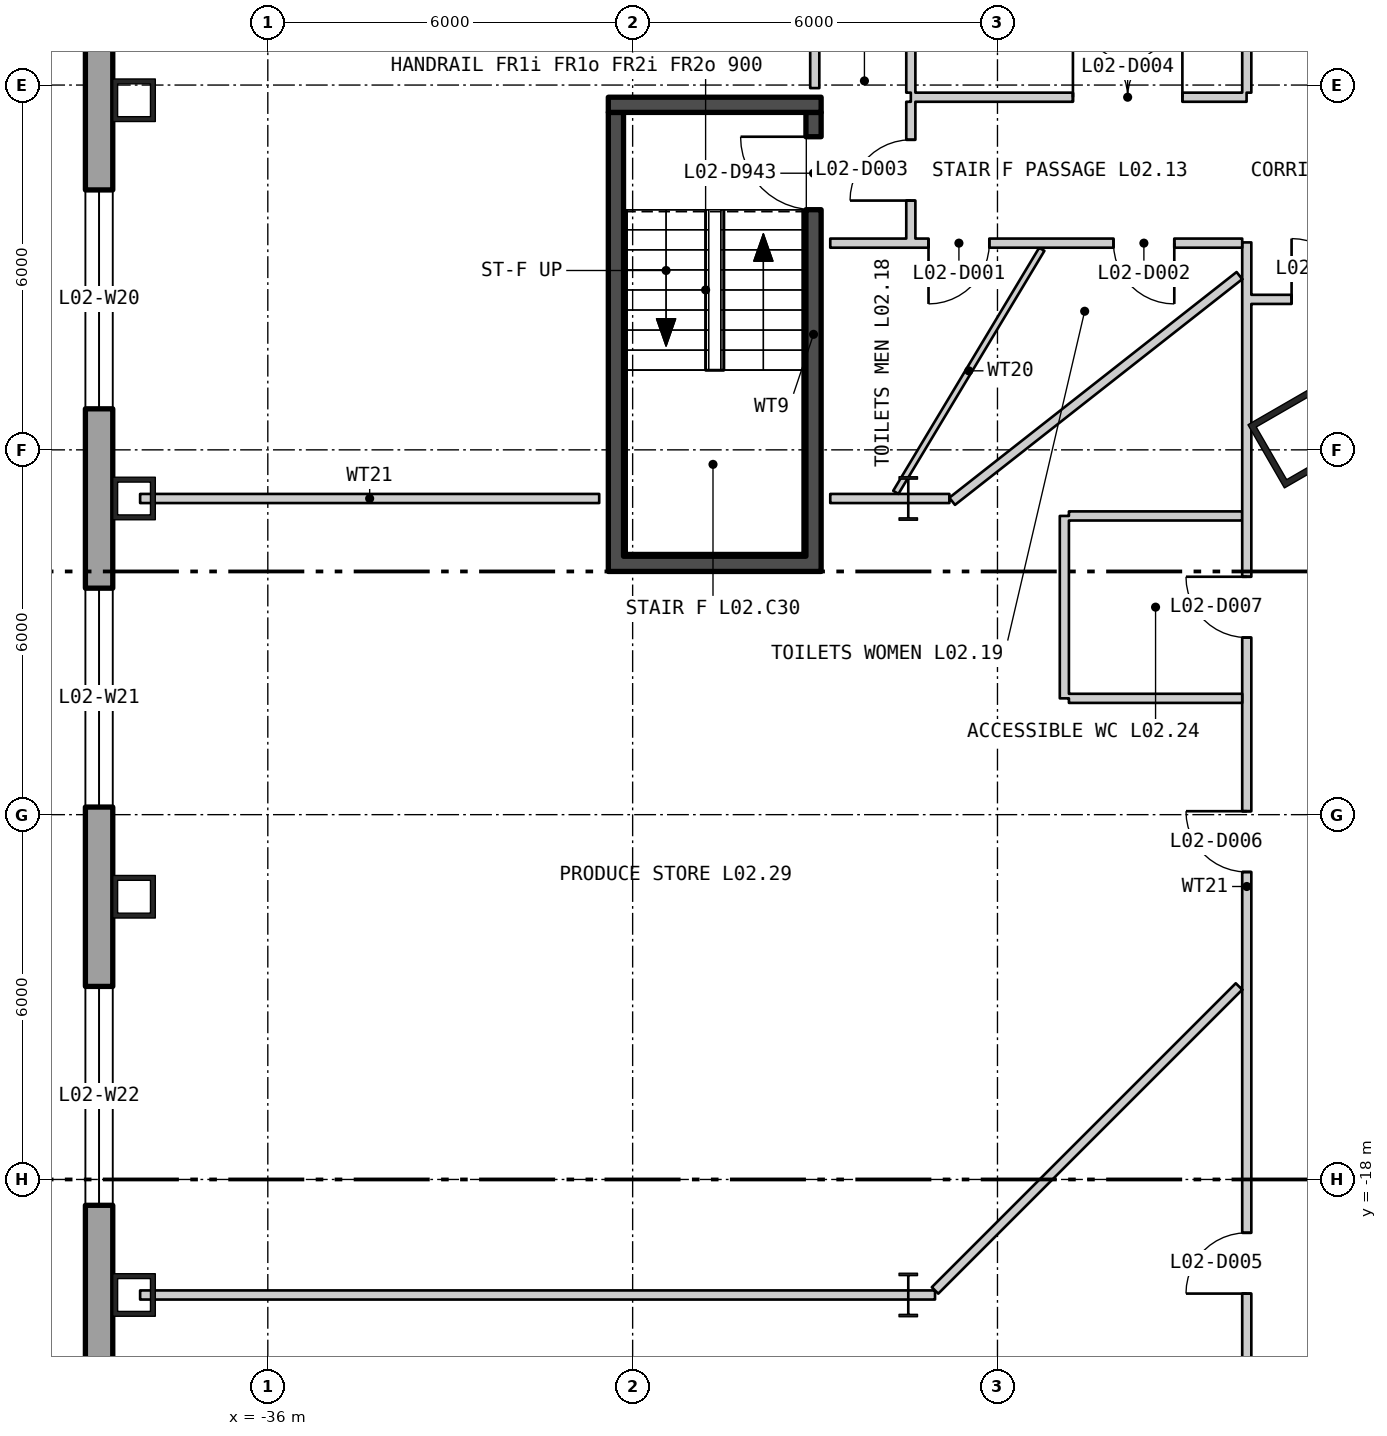
"""IFC4 building model, lengths in metres.
Left out: names, types, materials, properties, quantities, classifications, styles, units other than length and angle.
Written with IfcOpenShell. Run it as: python <this file> out.ifc"""

import sys

from ifc_helpers import new_model, si_unit, direction, frame, frame_2d, origin, origin_2d, place, context, subcontext, project, spatial, polyline, rectangle, hollow_rectangle, i_section, outline, extrude, element, fill, save


model = new_model("IFC4")
c1 = context("Model", 3, precision=1e-05, world=origin(), true_north=direction((0.0, 1.0)))
c2 = subcontext(c1, "Body", "Model", "MODEL_VIEW")
j1 = project(units=[si_unit("LENGTHUNIT", "METRE"), si_unit("PLANEANGLEUNIT", "RADIAN")], contexts=[c1])
p1 = place(None, origin())
s1 = spatial("IfcSite", under=j1, at=p1, CompositionType="ELEMENT")
p2 = place(p1, origin())
s2 = spatial("IfcBuilding", under=s1, at=p2, CompositionType="ELEMENT")
p3 = place(p2, frame((0.0, 0.0, 13.5)))
s3 = spatial("IfcBuildingStorey", under=s2, at=p3, CompositionType="ELEMENT", Elevation=13.5)
p4 = place(p3, frame((-19.061, -5.807, 0.0), z_axis=(0.0, 0.0, 1.0), x_axis=(0.5, -0.866025403784, 0.0)))
e1 = element("IfcColumn", 1, at=p4, inside=s3, PredefinedType="COLUMN", context=c2, shape_type="SweptSolid", body=[
    extrude(hollow_rectangle(XDim=1.2, YDim=1.2, WallThickness=0.1, at=origin_2d()), origin(), (0.0, 0.0, 1.0), 5.1),
])
for number, where, z_axis, x_axis in (
    (2, (-38.2, -0.25, 0.0), (0.0, 0.0, 1.0), (0.0, -1.0, 0.0)),
    (3, (-38.2, -6.8, 0.0), (0.0, 0.0, 1.0), (0.0, -1.0, 0.0)),
    (4, (-38.2, -13.35, 0.0), (0.0, 0.0, 1.0), (0.0, -1.0, 0.0)),
    (5, (-38.2, -19.9, 0.0), (0.0, 0.0, 1.0), (0.0, -1.0, 0.0)),
):
    element("IfcColumn", number, at=place(p3, frame(where, z_axis=z_axis, x_axis=x_axis)), inside=s3, PredefinedType="COLUMN", context=c2, shape_type="SweptSolid", body=[
        extrude(hollow_rectangle(XDim=0.7, YDim=0.7, WallThickness=0.08, at=origin_2d()), origin(), (0.0, 0.0, 1.0), 5.1),
    ])
for number, where, z_axis, x_axis in (
    (6, (-25.467, -6.8, 0.0), (0.0, 0.0, 1.0), (1.0, 0.0, 0.0)),
    (7, (-25.467, -19.9, 0.0), (0.0, 0.0, 1.0), (1.0, 0.0, 0.0)),
):
    element("IfcColumn", number, at=place(p3, frame(where, z_axis=z_axis, x_axis=x_axis)), inside=s3, PredefinedType="COLUMN", context=c2, shape_type="SweptSolid", body=[
        extrude(i_section(OverallWidth=0.304, OverallDepth=0.716, WebThickness=0.021, FlangeThickness=0.04, at=origin_2d()), origin(), (0.0, 0.0, 1.0), 5.1),
    ])
p5 = place(p3, frame((-38.775, 19.975, -0.4), z_axis=(0.0, 0.0, 1.0), x_axis=(0.0, -1.0, 0.0)))
e8 = element("IfcWall", 8, at=p5, inside=s3, PredefinedType="SOLIDWALL", context=c2, shape_type="SweptSolid", body=[
    extrude(outline(polyline([(-0.225, -0.225), (53.775, -0.225), (53.325, 0.225), (0.225, 0.225), (-0.225, -0.225)])), origin(), (0.0, 0.0, 1.0), 5.1),
])
p6 = place(p5, frame((2.05, 0.0, 1.3)))
e9 = element("IfcOpeningElement", 9, at=p6, cuts=e8, PredefinedType="OPENING", context=c2, shape_type="SweptSolid", body=[
    extrude(rectangle(XDim=3.6, YDim=3.2, at=frame_2d((1.8, 1.6))), frame((0.0, 0.235, 0.0), z_axis=(0.0, -1.0, 0.0), x_axis=(1.0, 0.0, 0.0)), (0.0, 0.0, 1.0), 0.47),
])
p7 = place(p5, frame((8.6, 0.0, 1.3)))
e10 = element("IfcOpeningElement", 10, at=p7, cuts=e8, PredefinedType="OPENING", context=c2, shape_type="SweptSolid", body=[
    extrude(rectangle(XDim=3.6, YDim=3.2, at=frame_2d((1.8, 1.6))), frame((0.0, 0.235, 0.0), z_axis=(0.0, -1.0, 0.0), x_axis=(1.0, 0.0, 0.0)), (0.0, 0.0, 1.0), 0.47),
])
p8 = place(p5, frame((15.15, 0.0, 1.3)))
e11 = element("IfcOpeningElement", 11, at=p8, cuts=e8, PredefinedType="OPENING", context=c2, shape_type="SweptSolid", body=[
    extrude(rectangle(XDim=3.6, YDim=3.2, at=frame_2d((1.8, 1.6))), frame((0.0, 0.235, 0.0), z_axis=(0.0, -1.0, 0.0), x_axis=(1.0, 0.0, 0.0)), (0.0, 0.0, 1.0), 0.47),
])
p9 = place(p5, frame((21.7, 0.0, 1.3)))
e12 = element("IfcOpeningElement", 12, at=p9, cuts=e8, PredefinedType="OPENING", context=c2, shape_type="SweptSolid", body=[
    extrude(rectangle(XDim=3.6, YDim=3.2, at=frame_2d((1.8, 1.6))), frame((0.0, 0.235, 0.0), z_axis=(0.0, -1.0, 0.0), x_axis=(1.0, 0.0, 0.0)), (0.0, 0.0, 1.0), 0.47),
])
p10 = place(p5, frame((28.25, 0.0, 1.3)))
e13 = element("IfcOpeningElement", 13, at=p10, cuts=e8, PredefinedType="OPENING", context=c2, shape_type="SweptSolid", body=[
    extrude(rectangle(XDim=3.6, YDim=3.2, at=frame_2d((1.8, 1.6))), frame((0.0, 0.235, 0.0), z_axis=(0.0, -1.0, 0.0), x_axis=(1.0, 0.0, 0.0)), (0.0, 0.0, 1.0), 0.47),
])
p11 = place(p5, frame((34.8, 0.0, 1.3)))
e14 = element("IfcOpeningElement", 14, at=p11, cuts=e8, PredefinedType="OPENING", context=c2, shape_type="SweptSolid", body=[
    extrude(rectangle(XDim=3.6, YDim=3.2, at=frame_2d((1.8, 1.6))), frame((0.0, 0.235, 0.0), z_axis=(0.0, -1.0, 0.0), x_axis=(1.0, 0.0, 0.0)), (0.0, 0.0, 1.0), 0.47),
])
p12 = place(p5, frame((41.35, 0.0, 1.3)))
e15 = element("IfcOpeningElement", 15, at=p12, cuts=e8, PredefinedType="OPENING", context=c2, shape_type="SweptSolid", body=[
    extrude(rectangle(XDim=3.6, YDim=3.2, at=frame_2d((1.8, 1.6))), frame((0.0, 0.235, 0.0), z_axis=(0.0, -1.0, 0.0), x_axis=(1.0, 0.0, 0.0)), (0.0, 0.0, 1.0), 0.47),
])
p13 = place(p5, frame((47.9, 0.0, 1.3)))
e16 = element("IfcOpeningElement", 16, at=p13, cuts=e8, PredefinedType="OPENING", context=c2, shape_type="SweptSolid", body=[
    extrude(rectangle(XDim=3.6, YDim=3.2, at=frame_2d((1.8, 1.6))), frame((0.0, 0.235, 0.0), z_axis=(0.0, -1.0, 0.0), x_axis=(1.0, 0.0, 0.0)), (0.0, 0.0, 1.0), 0.47),
])
p14 = place(p3, frame((-30.275, -7.75, 0.0), z_axis=(0.0, 0.0, 1.0), x_axis=(0.0, 1.0, 0.0)))
e17 = element("IfcWall", 17, at=p14, inside=s3, PredefinedType="SHEAR", context=c2, shape_type="SweptSolid", body=[
    extrude(rectangle(XDim=7.3, YDim=0.25, at=frame_2d((3.65, 0.0))), origin(), (0.0, 0.0, 1.0), 4.88),
])
p15 = place(p3, frame((-27.025, -7.75, 0.0), z_axis=(0.0, 0.0, 1.0), x_axis=(0.0, 1.0, 0.0)))
e18 = element("IfcWall", 18, at=p15, inside=s3, PredefinedType="SHEAR", context=c2, shape_type="SweptSolid", body=[
    extrude(rectangle(XDim=7.3, YDim=0.25, at=frame_2d((3.65, 0.0))), origin(), (0.0, 0.0, 1.0), 4.88),
])
p16 = place(p15, frame((5.7, 0.0, 0.0)))
e19 = element("IfcOpeningElement", 19, at=p16, cuts=e18, PredefinedType="OPENING", context=c2, shape_type="SweptSolid", body=[
    extrude(rectangle(XDim=1.2, YDim=2.1, at=frame_2d((0.6, 1.05))), frame((0.0, 0.135, 0.0), z_axis=(0.0, -1.0, 0.0), x_axis=(1.0, 0.0, 0.0)), (0.0, 0.0, 1.0), 0.27),
])
for number, where, z_axis, x_axis in (
    (20, (-30.4, -7.875, 0.0), (0.0, 0.0, 1.0), (1.0, 0.0, 0.0)),
    (21, (-30.4, -0.325, 0.0), (0.0, 0.0, 1.0), (1.0, 0.0, 0.0)),
):
    element("IfcWall", number, at=place(p3, frame(where, z_axis=z_axis, x_axis=x_axis)), inside=s3, PredefinedType="SHEAR", context=c2, shape_type="SweptSolid", body=[
        extrude(rectangle(XDim=3.5, YDim=0.25, at=frame_2d((1.75, 0.0))), origin(), (0.0, 0.0, 1.0), 4.88),
    ])
p17 = place(p3, frame((-38.1, -19.9, 0.0), z_axis=(0.0, 0.0, 1.0), x_axis=(1.0, 0.0, 0.0)))
e22 = element("IfcWall", 22, at=p17, inside=s3, PredefinedType="PARTITIONING", context=c2, shape_type="SweptSolid", body=[
    extrude(rectangle(XDim=12.633, YDim=0.15, at=frame_2d((6.316, 0.0))), origin(), (0.0, 0.0, 1.0), 4.09),
])
p18 = place(p3, frame((-25.467, -19.9, 0.0), z_axis=(0.0, 0.0, 1.0), x_axis=(1.0, 0.0, 0.0)))
e23 = element("IfcWall", 23, at=p18, inside=s3, PredefinedType="PARTITIONING", context=c2, shape_type="SweptSolid", body=[
    extrude(rectangle(XDim=0.44, YDim=0.15, at=frame_2d((0.22, 0.0))), origin(), (0.0, 0.0, 1.0), 4.88),
])
p19 = place(p3, frame((-38.1, -6.8, 0.0), z_axis=(0.0, 0.0, 1.0), x_axis=(1.0, 0.0, 0.0)))
e24 = element("IfcWall", 24, at=p19, inside=s3, PredefinedType="PARTITIONING", context=c2, shape_type="SweptSolid", body=[
    extrude(rectangle(XDim=7.55, YDim=0.15, at=frame_2d((3.775, 0.0))), origin(), (0.0, 0.0, 1.0), 4.09),
])
p20 = place(p3, frame((-27.005, -0.05, 0.0), z_axis=(0.0, 0.0, 1.0), x_axis=(0.0, 1.0, 0.0)))
e25 = element("IfcWall", 25, at=p20, inside=s3, PredefinedType="PARTITIONING", context=c2, shape_type="SweptSolid", body=[
    extrude(rectangle(XDim=0.825, YDim=0.15, at=frame_2d((0.412, 0.0))), origin(), (0.0, 0.0, 1.0), 4.88),
])
p21 = place(p3, frame((-26.75, -6.8, 0.0), z_axis=(0.0, 0.0, 1.0), x_axis=(1.0, 0.0, 0.0)))
e26 = element("IfcWall", 26, at=p21, inside=s3, PredefinedType="PARTITIONING", context=c2, shape_type="SweptSolid", body=[
    extrude(rectangle(XDim=1.959, YDim=0.15, at=frame_2d((0.98, 0.0))), origin(), (0.0, 0.0, 1.0), 4.09),
])
p22 = place(p3, frame((-26.75, -2.6, 0.0), z_axis=(0.0, 0.0, 1.0), x_axis=(1.0, 0.0, 0.0)))
e27 = element("IfcWall", 27, at=p22, inside=s3, PredefinedType="PARTITIONING", context=c2, shape_type="SweptSolid", body=[
    extrude(rectangle(XDim=6.775, YDim=0.15, at=frame_2d((3.388, 0.0))), origin(), (0.0, 0.0, 1.0), 4.88),
])
p23 = place(p22, frame((1.616, 0.0, 0.0)))
e28 = element("IfcOpeningElement", 28, at=p23, cuts=e27, PredefinedType="OPENING", context=c2, shape_type="SweptSolid", body=[
    extrude(rectangle(XDim=1.0, YDim=2.1, at=frame_2d((0.5, 1.05))), frame((0.0, 0.085, 0.0), z_axis=(0.0, -1.0, 0.0), x_axis=(1.0, 0.0, 0.0)), (0.0, 0.0, 1.0), 0.17),
])
p24 = place(p22, frame((4.658, 0.0, 0.0)))
e29 = element("IfcOpeningElement", 29, at=p24, cuts=e27, PredefinedType="OPENING", context=c2, shape_type="SweptSolid", body=[
    extrude(rectangle(XDim=1.0, YDim=2.1, at=frame_2d((0.5, 1.05))), frame((0.0, 0.085, 0.0), z_axis=(0.0, -1.0, 0.0), x_axis=(1.0, 0.0, 0.0)), (0.0, 0.0, 1.0), 0.17),
])
p25 = place(p3, frame((-25.672, -6.699, 0.0), z_axis=(0.0, 0.0, 1.0), x_axis=(0.5148425828, 0.857284733875, 0.0)))
e30 = element("IfcWall", 30, at=p25, inside=s3, PredefinedType="PARTITIONING", context=c2, shape_type="SweptSolid", body=[
    extrude(rectangle(XDim=4.664, YDim=0.1, at=frame_2d((2.332, 0.0))), origin(), (0.0, 0.0, 1.0), 4.88),
])
p26 = place(p3, frame((-25.425, -2.525, 0.0), z_axis=(0.0, 0.0, 1.0), x_axis=(0.0, 1.0, 0.0)))
e31 = element("IfcWall", 31, at=p26, inside=s3, PredefinedType="PARTITIONING", context=c2, shape_type="SweptSolid", body=[
    extrude(rectangle(XDim=2.25, YDim=0.15, at=frame_2d((1.125, 0.0))), origin(), (0.0, 0.0, 1.0), 4.19),
])
p27 = place(p26, frame((0.625, 0.0, 0.0)))
e32 = element("IfcOpeningElement", 32, at=p27, cuts=e31, PredefinedType="OPENING", context=c2, shape_type="SweptSolid", body=[
    extrude(rectangle(XDim=1.0, YDim=2.1, at=frame_2d((0.5, 1.05))), frame((0.0, 0.085, 0.0), z_axis=(0.0, -1.0, 0.0), x_axis=(1.0, 0.0, 0.0)), (0.0, 0.0, 1.0), 0.17),
])
p28 = place(p3, frame((-25.425, -0.2, 0.0), z_axis=(0.0, 0.0, 1.0), x_axis=(1.0, 0.0, 0.0)))
e33 = element("IfcWall", 33, at=p28, inside=s3, PredefinedType="PARTITIONING", context=c2, shape_type="SweptSolid", body=[
    extrude(rectangle(XDim=5.522, YDim=0.15, at=frame_2d((2.761, 0.0))), origin(), (0.0, 0.0, 1.0), 4.88),
])
p29 = place(p28, frame((2.666, 0.0, 0.0)))
e34 = element("IfcOpeningElement", 34, at=p29, cuts=e33, PredefinedType="OPENING", context=c2, shape_type="SweptSolid", body=[
    extrude(rectangle(XDim=1.8, YDim=2.1, at=frame_2d((0.9, 1.05))), frame((0.0, 0.085, 0.0), z_axis=(0.0, -1.0, 0.0), x_axis=(1.0, 0.0, 0.0)), (0.0, 0.0, 1.0), 0.17),
])
p30 = place(p3, frame((-25.425, -0.125, 0.0), z_axis=(0.0, 0.0, 1.0), x_axis=(0.0, 1.0, 0.0)))
e35 = element("IfcWall", 35, at=p30, inside=s3, PredefinedType="PARTITIONING", context=c2, shape_type="SweptSolid", body=[
    extrude(rectangle(XDim=1.05, YDim=0.15, at=frame_2d((0.525, 0.0))), origin(), (0.0, 0.0, 1.0), 4.19),
])
p31 = place(p3, frame((-25.027, -19.825, 0.0), z_axis=(0.0, 0.0, 1.0), x_axis=(0.707106781187, 0.707106781187, 0.0)))
e36 = element("IfcWall", 36, at=p31, inside=s3, PredefinedType="PARTITIONING", context=c2, shape_type="SweptSolid", body=[
    extrude(rectangle(XDim=7.07, YDim=0.15, at=frame_2d((3.535, 0.0))), origin(), (0.0, 0.0, 1.0), 4.88),
])
p32 = place(p3, frame((-24.745, -6.846, 0.0), z_axis=(0.0, 0.0, 1.0), x_axis=(0.786295235231, 0.617850955372, 0.0)))
e37 = element("IfcWall", 37, at=p32, inside=s3, PredefinedType="PARTITIONING", context=c2, shape_type="SweptSolid", body=[
    extrude(rectangle(XDim=6.008, YDim=0.15, at=frame_2d((3.004, 0.0))), origin(), (0.0, 0.0, 1.0), 4.88),
])
p33 = place(p3, frame((-22.9, -10.087, 0.0), z_axis=(0.0, 0.0, 1.0), x_axis=(0.0, 1.0, 0.0)))
e38 = element("IfcWall", 38, at=p33, inside=s3, PredefinedType="PARTITIONING", context=c2, shape_type="SweptSolid", body=[
    extrude(rectangle(XDim=3.0, YDim=0.15, at=frame_2d((1.5, 0.0))), origin(), (0.0, 0.0, 1.0), 4.88),
])
for number, where, z_axis, x_axis in (
    (39, (-22.825, -10.087, 0.0), (0.0, 0.0, 1.0), (1.0, 0.0, 0.0)),
    (40, (-22.825, -7.087, 0.0), (0.0, 0.0, 1.0), (1.0, 0.0, 0.0)),
):
    element("IfcWall", number, at=place(p3, frame(where, z_axis=z_axis, x_axis=x_axis)), inside=s3, PredefinedType="PARTITIONING", context=c2, shape_type="SweptSolid", body=[
        extrude(rectangle(XDim=2.85, YDim=0.15, at=frame_2d((1.425, 0.0))), origin(), (0.0, 0.0, 1.0), 4.88),
    ])
p34 = place(p3, frame((-19.9, -23.775, 0.0), z_axis=(0.0, 0.0, 1.0), x_axis=(0.0, 1.0, 0.0)))
e41 = element("IfcWall", 41, at=p34, inside=s3, PredefinedType="PARTITIONING", context=c2, shape_type="SweptSolid", body=[
    extrude(rectangle(XDim=21.187, YDim=0.15, at=frame_2d((10.594, 0.0))), origin(), (0.0, 0.0, 1.0), 4.88),
])
p35 = place(p34, frame((3.898, 0.0, 0.0)))
e42 = element("IfcOpeningElement", 42, at=p35, cuts=e41, PredefinedType="OPENING", context=c2, shape_type="SweptSolid", body=[
    extrude(rectangle(XDim=1.0, YDim=2.1, at=frame_2d((0.5, 1.05))), frame((0.0, 0.085, 0.0), z_axis=(0.0, -1.0, 0.0), x_axis=(1.0, 0.0, 0.0)), (0.0, 0.0, 1.0), 0.17),
])
p36 = place(p34, frame((10.832, 0.0, 0.0)))
e43 = element("IfcOpeningElement", 43, at=p36, cuts=e41, PredefinedType="OPENING", context=c2, shape_type="SweptSolid", body=[
    extrude(rectangle(XDim=1.0, YDim=2.1, at=frame_2d((0.5, 1.05))), frame((0.0, 0.085, 0.0), z_axis=(0.0, -1.0, 0.0), x_axis=(1.0, 0.0, 0.0)), (0.0, 0.0, 1.0), 0.17),
])
p37 = place(p34, frame((14.688, 0.0, 0.0)))
e44 = element("IfcOpeningElement", 44, at=p37, cuts=e41, PredefinedType="OPENING", context=c2, shape_type="SweptSolid", body=[
    extrude(rectangle(XDim=1.0, YDim=2.1, at=frame_2d((0.5, 1.05))), frame((0.0, 0.085, 0.0), z_axis=(0.0, -1.0, 0.0), x_axis=(1.0, 0.0, 0.0)), (0.0, 0.0, 1.0), 0.17),
])
p38 = place(p3, frame((-19.9, -0.125, 0.0), z_axis=(0.0, 0.0, 1.0), x_axis=(0.0, 1.0, 0.0)))
e45 = element("IfcWall", 45, at=p38, inside=s3, PredefinedType="PARTITIONING", context=c2, shape_type="SweptSolid", body=[
    extrude(rectangle(XDim=1.15, YDim=0.15, at=frame_2d((0.575, 0.0))), origin(), (0.0, 0.0, 1.0), 4.88),
])
p39 = place(p3, frame((-19.825, -3.525, 0.0), z_axis=(0.0, 0.0, 1.0), x_axis=(1.0, 0.0, 0.0)))
e46 = element("IfcWall", 46, at=p39, inside=s3, PredefinedType="PARTITIONING", context=c2, shape_type="SweptSolid", body=[
    extrude(rectangle(XDim=2.325, YDim=0.15, at=frame_2d((1.163, 0.0))), origin(), (0.0, 0.0, 1.0), 4.88),
])
p40 = place(p39, frame((0.662, 0.0, 0.0)))
e47 = element("IfcOpeningElement", 47, at=p40, cuts=e46, PredefinedType="OPENING", context=c2, shape_type="SweptSolid", body=[
    extrude(rectangle(XDim=1.0, YDim=2.1, at=frame_2d((0.5, 1.05))), frame((0.0, 0.085, 0.0), z_axis=(0.0, -1.0, 0.0), x_axis=(1.0, 0.0, 0.0)), (0.0, 0.0, 1.0), 0.17),
])
p41 = place(p9, origin())
e48 = element("IfcWindow", 48, at=p41, inside=s3, PartitioningType="SINGLE_PANEL", PredefinedType="WINDOW", context=c2, shape_type="SweptSolid", body=[
    extrude(rectangle(XDim=3.6, YDim=3.2, at=frame_2d((1.8, 1.6))), frame((0.0, 0.105, 0.0), z_axis=(0.0, -1.0, 0.0), x_axis=(1.0, 0.0, 0.0)), (0.0, 0.0, 1.0), 0.06),
])
fill(e12, e48)
p42 = place(p10, origin())
e49 = element("IfcWindow", 49, at=p42, inside=s3, PartitioningType="SINGLE_PANEL", PredefinedType="WINDOW", context=c2, shape_type="SweptSolid", body=[
    extrude(rectangle(XDim=3.6, YDim=3.2, at=frame_2d((1.8, 1.6))), frame((0.0, 0.105, 0.0), z_axis=(0.0, -1.0, 0.0), x_axis=(1.0, 0.0, 0.0)), (0.0, 0.0, 1.0), 0.06),
])
fill(e13, e49)
p43 = place(p11, origin())
e50 = element("IfcWindow", 50, at=p43, inside=s3, PartitioningType="SINGLE_PANEL", PredefinedType="WINDOW", context=c2, shape_type="SweptSolid", body=[
    extrude(rectangle(XDim=3.6, YDim=3.2, at=frame_2d((1.8, 1.6))), frame((0.0, 0.105, 0.0), z_axis=(0.0, -1.0, 0.0), x_axis=(1.0, 0.0, 0.0)), (0.0, 0.0, 1.0), 0.06),
])
fill(e14, e50)
p44 = place(p16, origin())
e51 = element("IfcDoor", 51, at=p44, inside=s3, OperationType="SINGLE_SWING_LEFT", PredefinedType="DOOR", context=c2, shape_type="SweptSolid", body=[
    extrude(rectangle(XDim=1.2, YDim=2.1, at=frame_2d((0.6, 1.05))), frame((0.0, 0.025, 0.0), z_axis=(0.0, -1.0, 0.0), x_axis=(1.0, 0.0, 0.0)), (0.0, 0.0, 1.0), 0.05),
])
fill(e19, e51)
p45 = place(p23, origin())
e52 = element("IfcDoor", 52, at=p45, inside=s3, OperationType="SINGLE_SWING_LEFT", PredefinedType="DOOR", context=c2, shape_type="SweptSolid", body=[
    extrude(rectangle(XDim=1.0, YDim=2.1, at=frame_2d((0.5, 1.05))), frame((0.0, 0.025, 0.0), z_axis=(0.0, -1.0, 0.0), x_axis=(1.0, 0.0, 0.0)), (0.0, 0.0, 1.0), 0.05),
])
fill(e28, e52)
p46 = place(p24, origin())
e53 = element("IfcDoor", 53, at=p46, inside=s3, OperationType="SINGLE_SWING_RIGHT", PredefinedType="DOOR", context=c2, shape_type="SweptSolid", body=[
    extrude(rectangle(XDim=1.0, YDim=2.1, at=frame_2d((0.5, 1.05))), frame((0.0, 0.025, 0.0), z_axis=(0.0, -1.0, 0.0), x_axis=(1.0, 0.0, 0.0)), (0.0, 0.0, 1.0), 0.05),
])
fill(e29, e53)
p47 = place(p27, origin())
e54 = element("IfcDoor", 54, at=p47, inside=s3, OperationType="SINGLE_SWING_RIGHT", PredefinedType="DOOR", context=c2, shape_type="SweptSolid", body=[
    extrude(rectangle(XDim=1.0, YDim=2.1, at=frame_2d((0.5, 1.05))), frame((0.0, 0.025, 0.0), z_axis=(0.0, -1.0, 0.0), x_axis=(1.0, 0.0, 0.0)), (0.0, 0.0, 1.0), 0.05),
])
fill(e32, e54)
p48 = place(p29, origin())
e55 = element("IfcDoor", 55, at=p48, inside=s3, OperationType="DOUBLE_DOOR_SINGLE_SWING", PredefinedType="DOOR", context=c2, shape_type="SweptSolid", body=[
    extrude(rectangle(XDim=1.8, YDim=2.1, at=frame_2d((0.9, 1.05))), frame((0.0, 0.025, 0.0), z_axis=(0.0, -1.0, 0.0), x_axis=(1.0, 0.0, 0.0)), (0.0, 0.0, 1.0), 0.05),
])
fill(e34, e55)
p49 = place(p35, origin())
e56 = element("IfcDoor", 56, at=p49, inside=s3, OperationType="SINGLE_SWING_RIGHT", PredefinedType="DOOR", context=c2, shape_type="SweptSolid", body=[
    extrude(rectangle(XDim=1.0, YDim=2.1, at=frame_2d((0.5, 1.05))), frame((0.0, 0.025, 0.0), z_axis=(0.0, -1.0, 0.0), x_axis=(1.0, 0.0, 0.0)), (0.0, 0.0, 1.0), 0.05),
])
fill(e42, e56)
p50 = place(p36, origin())
e57 = element("IfcDoor", 57, at=p50, inside=s3, OperationType="SINGLE_SWING_LEFT", PredefinedType="DOOR", context=c2, shape_type="SweptSolid", body=[
    extrude(rectangle(XDim=1.0, YDim=2.1, at=frame_2d((0.5, 1.05))), frame((0.0, 0.025, 0.0), z_axis=(0.0, -1.0, 0.0), x_axis=(1.0, 0.0, 0.0)), (0.0, 0.0, 1.0), 0.05),
])
fill(e43, e57)
p51 = place(p37, origin())
e58 = element("IfcDoor", 58, at=p51, inside=s3, OperationType="SINGLE_SWING_LEFT", PredefinedType="DOOR", context=c2, shape_type="SweptSolid", body=[
    extrude(rectangle(XDim=1.0, YDim=2.1, at=frame_2d((0.5, 1.05))), frame((0.0, 0.025, 0.0), z_axis=(0.0, -1.0, 0.0), x_axis=(1.0, 0.0, 0.0)), (0.0, 0.0, 1.0), 0.05),
])
fill(e44, e58)
p52 = place(p40, origin())
e59 = element("IfcDoor", 59, at=p52, inside=s3, OperationType="SINGLE_SWING_RIGHT", PredefinedType="DOOR", context=c2, shape_type="SweptSolid", body=[
    extrude(rectangle(XDim=1.0, YDim=2.1, at=frame_2d((0.5, 1.05))), frame((0.0, 0.025, 0.0), z_axis=(0.0, -1.0, 0.0), x_axis=(1.0, 0.0, 0.0)), (0.0, 0.0, 1.0), 0.05),
])
fill(e47, e59)
save(model, sys.argv[1])
